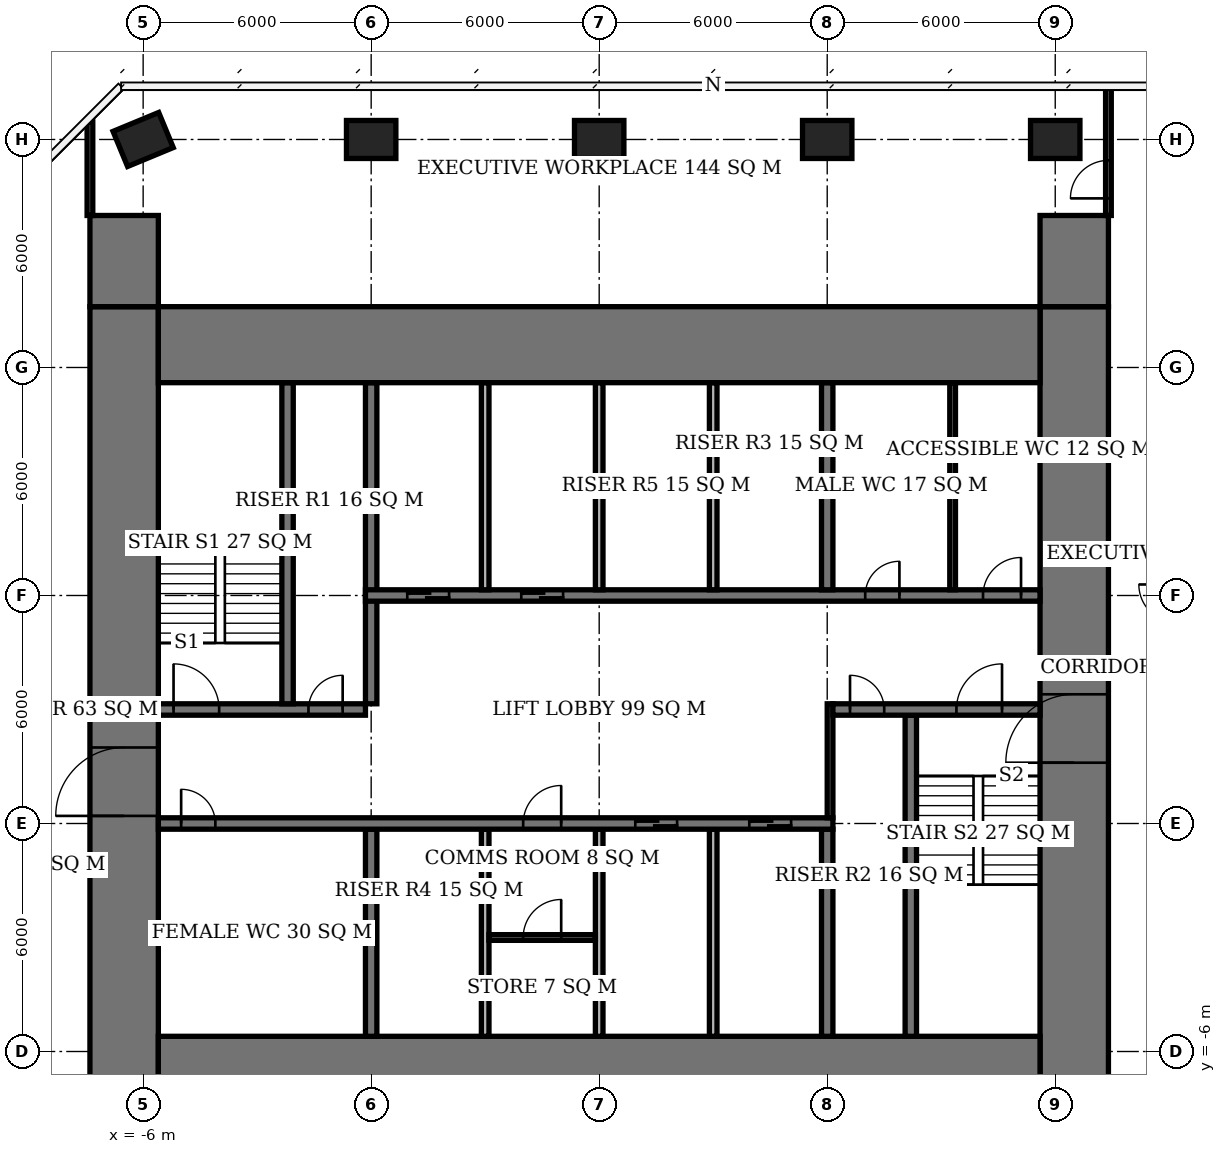
"""IFC4 building model, lengths in metres.
Left out: names, types, materials, properties, quantities, classifications, styles, units other than length and angle.
Written with IfcOpenShell. Run it as: python <this file> out.ifc"""

import sys

from ifc_helpers import new_model, si_unit, direction, frame, frame_2d, origin, origin_2d, place, context, subcontext, project, spatial, rectangle, extrude, element, fill, save


model = new_model("IFC4")
c1 = context("Model", 3, precision=1e-05, world=origin(), true_north=direction((0.0, 1.0)))
c2 = subcontext(c1, "Body", "Model", "MODEL_VIEW")
j1 = project(units=[si_unit("LENGTHUNIT", "METRE"), si_unit("PLANEANGLEUNIT", "RADIAN")], contexts=[c1])
p1 = place(None, origin())
s1 = spatial("IfcSite", under=j1, at=p1, CompositionType="ELEMENT")
p2 = place(p1, origin())
s2 = spatial("IfcBuilding", under=s1, at=p2, CompositionType="ELEMENT")
p3 = place(p2, frame((0.0, 0.0, 272.3)))
s3 = spatial("IfcBuildingStorey", under=s2, at=p3, CompositionType="ELEMENT", Elevation=272.3)
for number, where, z_axis, x_axis in (
    (1, (-6.0, 18.0, 0.0), (0.0, 0.0, 1.0), (0.924, 0.383, 0.0)),
    (2, (0.0, 18.0, 0.0), (0.0, 0.0, 1.0), (1.0, 0.0, 0.0)),
    (3, (6.0, 18.0, 0.0), (0.0, 0.0, 1.0), (1.0, 0.0, 0.0)),
    (4, (12.0, 18.0, 0.0), (0.0, 0.0, 1.0), (1.0, 0.0, 0.0)),
    (5, (18.0, 18.0, 0.0), (0.0, 0.0, 1.0), (1.0, 0.0, 0.0)),
):
    element("IfcColumn", number, at=place(p3, frame(where, z_axis=z_axis, x_axis=x_axis)), inside=s3, PredefinedType="COLUMN", context=c2, shape_type="SweptSolid", body=[
        extrude(rectangle(XDim=1.3, YDim=1.0, at=origin_2d()), origin(), (0.0, 0.0, 1.0), 3.9),
    ])
for number, where, z_axis, x_axis in (
    (6, (-5.6, -6.6, 0.0), (0.0, 0.0, 1.0), (1.0, 0.0, 0.0)),
    (7, (-5.6, 12.6, 0.0), (0.0, 0.0, 1.0), (1.0, 0.0, 0.0)),
):
    element("IfcWall", number, at=place(p3, frame(where, z_axis=z_axis, x_axis=x_axis)), inside=s3, PredefinedType="SHEAR", context=c2, shape_type="SweptSolid", body=[
        extrude(rectangle(XDim=23.2, YDim=2.0, at=frame_2d((11.6, 0.0))), origin(), (0.0, 0.0, 1.0), 3.9),
    ])
p4 = place(p3, frame((-6.5, -7.6, 0.0), z_axis=(0.0, 0.0, 1.0), x_axis=(0.0, 1.0, 0.0)))
e8 = element("IfcWall", 8, at=p4, inside=s3, PredefinedType="SHEAR", context=c2, shape_type="SweptSolid", body=[
    extrude(rectangle(XDim=21.2, YDim=1.8, at=frame_2d((10.6, 0.0))), origin(), (0.0, 0.0, 1.0), 3.9),
])
p5 = place(p4, frame((7.8, 0.0, 0.0)))
e9 = element("IfcOpeningElement", 9, at=p5, cuts=e8, PredefinedType="OPENING", context=c2, shape_type="SweptSolid", body=[
    extrude(rectangle(XDim=1.8, YDim=2.4, at=frame_2d((0.9, 1.2))), frame((0.0, 0.91, 0.0), z_axis=(0.0, -1.0, 0.0), x_axis=(1.0, 0.0, 0.0)), (0.0, 0.0, 1.0), 1.82),
])
p6 = place(p3, frame((18.5, -7.6, 0.0), z_axis=(0.0, 0.0, 1.0), x_axis=(0.0, 1.0, 0.0)))
e10 = element("IfcWall", 10, at=p6, inside=s3, PredefinedType="SHEAR", context=c2, shape_type="SweptSolid", body=[
    extrude(rectangle(XDim=21.2, YDim=1.8, at=frame_2d((10.6, 0.0))), origin(), (0.0, 0.0, 1.0), 3.9),
])
p7 = place(p6, frame((9.2, 0.0, 0.0)))
e11 = element("IfcOpeningElement", 11, at=p7, cuts=e10, PredefinedType="OPENING", context=c2, shape_type="SweptSolid", body=[
    extrude(rectangle(XDim=1.8, YDim=2.4, at=frame_2d((0.9, 1.2))), frame((0.0, 0.91, 0.0), z_axis=(0.0, -1.0, 0.0), x_axis=(1.0, 0.0, 0.0)), (0.0, 0.0, 1.0), 1.82),
])
for number, where, z_axis, x_axis in (
    (12, (-6.5, 13.6, 0.0), (0.0, 0.0, 1.0), (0.0, 1.0, 0.0)),
    (13, (18.5, 13.6, 0.0), (0.0, 0.0, 1.0), (0.0, 1.0, 0.0)),
):
    element("IfcWall", number, at=place(p3, frame(where, z_axis=z_axis, x_axis=x_axis)), inside=s3, PredefinedType="SHEAR", context=c2, shape_type="SweptSolid", body=[
        extrude(rectangle(XDim=2.4, YDim=1.8, at=frame_2d((1.2, 0.0))), origin(), (0.0, 0.0, 1.0), 3.9),
    ])
p8 = place(p3, frame((-5.6, 0.0, 0.0), z_axis=(0.0, 0.0, 1.0), x_axis=(1.0, 0.0, 0.0)))
e14 = element("IfcWall", 14, at=p8, inside=s3, PredefinedType="SHEAR", context=c2, shape_type="SweptSolid", body=[
    extrude(rectangle(XDim=17.75, YDim=0.3, at=frame_2d((8.875, 0.0))), origin(), (0.0, 0.0, 1.0), 3.9),
])
p9 = place(p8, frame((0.6, 0.0, 0.0)))
e15 = element("IfcOpeningElement", 15, at=p9, cuts=e14, PredefinedType="OPENING", context=c2, shape_type="SweptSolid", body=[
    extrude(rectangle(XDim=0.9, YDim=2.1, at=frame_2d((0.45, 1.05))), frame((0.0, 0.16, 0.0), z_axis=(0.0, -1.0, 0.0), x_axis=(1.0, 0.0, 0.0)), (0.0, 0.0, 1.0), 0.32),
])
p10 = place(p8, frame((9.6, 0.0, 0.0)))
e16 = element("IfcOpeningElement", 16, at=p10, cuts=e14, PredefinedType="OPENING", context=c2, shape_type="SweptSolid", body=[
    extrude(rectangle(XDim=1.0, YDim=2.1, at=frame_2d((0.5, 1.05))), frame((0.0, 0.16, 0.0), z_axis=(0.0, -1.0, 0.0), x_axis=(1.0, 0.0, 0.0)), (0.0, 0.0, 1.0), 0.32),
])
p11 = place(p8, frame((12.55, 0.0, 0.0)))
e17 = element("IfcOpeningElement", 17, at=p11, cuts=e14, PredefinedType="OPENING", context=c2, shape_type="SweptSolid", body=[
    extrude(rectangle(XDim=1.1, YDim=2.1, at=frame_2d((0.55, 1.05))), frame((0.0, 0.16, 0.0), z_axis=(0.0, -1.0, 0.0), x_axis=(1.0, 0.0, 0.0)), (0.0, 0.0, 1.0), 0.32),
])
p12 = place(p8, frame((15.55, 0.0, 0.0)))
e18 = element("IfcOpeningElement", 18, at=p12, cuts=e14, PredefinedType="OPENING", context=c2, shape_type="SweptSolid", body=[
    extrude(rectangle(XDim=1.1, YDim=2.1, at=frame_2d((0.55, 1.05))), frame((0.0, 0.16, 0.0), z_axis=(0.0, -1.0, 0.0), x_axis=(1.0, 0.0, 0.0)), (0.0, 0.0, 1.0), 0.32),
])
p13 = place(p3, frame((-5.6, 3.0, 0.0), z_axis=(0.0, 0.0, 1.0), x_axis=(1.0, 0.0, 0.0)))
e19 = element("IfcWall", 19, at=p13, inside=s3, PredefinedType="SHEAR", context=c2, shape_type="SweptSolid", body=[
    extrude(rectangle(XDim=5.45, YDim=0.3, at=frame_2d((2.725, 0.0))), origin(), (0.0, 0.0, 1.0), 3.9),
])
p14 = place(p13, frame((0.4, 0.0, 0.0)))
e20 = element("IfcOpeningElement", 20, at=p14, cuts=e19, PredefinedType="OPENING", context=c2, shape_type="SweptSolid", body=[
    extrude(rectangle(XDim=1.2, YDim=2.1, at=frame_2d((0.6, 1.05))), frame((0.0, 0.16, 0.0), z_axis=(0.0, -1.0, 0.0), x_axis=(1.0, 0.0, 0.0)), (0.0, 0.0, 1.0), 0.32),
])
p15 = place(p13, frame((3.95, 0.0, 0.0)))
e21 = element("IfcOpeningElement", 21, at=p15, cuts=e19, PredefinedType="OPENING", context=c2, shape_type="SweptSolid", body=[
    extrude(rectangle(XDim=0.9, YDim=2.1, at=frame_2d((0.45, 1.05))), frame((0.0, 0.16, 0.0), z_axis=(0.0, -1.0, 0.0), x_axis=(1.0, 0.0, 0.0)), (0.0, 0.0, 1.0), 0.32),
])
p16 = place(p3, frame((12.15, 3.0, 0.0), z_axis=(0.0, 0.0, 1.0), x_axis=(1.0, 0.0, 0.0)))
e22 = element("IfcWall", 22, at=p16, inside=s3, PredefinedType="SHEAR", context=c2, shape_type="SweptSolid", body=[
    extrude(rectangle(XDim=5.45, YDim=0.3, at=frame_2d((2.725, 0.0))), origin(), (0.0, 0.0, 1.0), 3.9),
])
p17 = place(p16, frame((3.25, 0.0, 0.0)))
e23 = element("IfcOpeningElement", 23, at=p17, cuts=e22, PredefinedType="OPENING", context=c2, shape_type="SweptSolid", body=[
    extrude(rectangle(XDim=1.2, YDim=2.1, at=frame_2d((0.6, 1.05))), frame((0.0, 0.16, 0.0), z_axis=(0.0, -1.0, 0.0), x_axis=(1.0, 0.0, 0.0)), (0.0, 0.0, 1.0), 0.32),
])
p18 = place(p16, frame((0.45, 0.0, 0.0)))
e24 = element("IfcOpeningElement", 24, at=p18, cuts=e22, PredefinedType="OPENING", context=c2, shape_type="SweptSolid", body=[
    extrude(rectangle(XDim=0.9, YDim=2.1, at=frame_2d((0.45, 1.05))), frame((0.0, 0.16, 0.0), z_axis=(0.0, -1.0, 0.0), x_axis=(1.0, 0.0, 0.0)), (0.0, 0.0, 1.0), 0.32),
])
p19 = place(p3, frame((-0.15, 6.0, 0.0), z_axis=(0.0, 0.0, 1.0), x_axis=(1.0, 0.0, 0.0)))
e25 = element("IfcWall", 25, at=p19, inside=s3, PredefinedType="SHEAR", context=c2, shape_type="SweptSolid", body=[
    extrude(rectangle(XDim=17.75, YDim=0.3, at=frame_2d((8.875, 0.0))), origin(), (0.0, 0.0, 1.0), 3.9),
])
p20 = place(p19, frame((13.15, 0.0, 0.0)))
e26 = element("IfcOpeningElement", 26, at=p20, cuts=e25, PredefinedType="OPENING", context=c2, shape_type="SweptSolid", body=[
    extrude(rectangle(XDim=0.9, YDim=2.1, at=frame_2d((0.45, 1.05))), frame((0.0, 0.16, 0.0), z_axis=(0.0, -1.0, 0.0), x_axis=(1.0, 0.0, 0.0)), (0.0, 0.0, 1.0), 0.32),
])
p21 = place(p19, frame((16.25, 0.0, 0.0)))
e27 = element("IfcOpeningElement", 27, at=p21, cuts=e25, PredefinedType="OPENING", context=c2, shape_type="SweptSolid", body=[
    extrude(rectangle(XDim=1.0, YDim=2.1, at=frame_2d((0.5, 1.05))), frame((0.0, 0.16, 0.0), z_axis=(0.0, -1.0, 0.0), x_axis=(1.0, 0.0, 0.0)), (0.0, 0.0, 1.0), 0.32),
])
p22 = place(p19, frame((1.1, 0.0, 0.0)))
e28 = element("IfcOpeningElement", 28, at=p22, cuts=e25, PredefinedType="OPENING", context=c2, shape_type="SweptSolid", body=[
    extrude(rectangle(XDim=1.1, YDim=2.1, at=frame_2d((0.55, 1.05))), frame((0.0, 0.16, 0.0), z_axis=(0.0, -1.0, 0.0), x_axis=(1.0, 0.0, 0.0)), (0.0, 0.0, 1.0), 0.32),
])
p23 = place(p19, frame((4.1, 0.0, 0.0)))
e29 = element("IfcOpeningElement", 29, at=p23, cuts=e25, PredefinedType="OPENING", context=c2, shape_type="SweptSolid", body=[
    extrude(rectangle(XDim=1.1, YDim=2.1, at=frame_2d((0.55, 1.05))), frame((0.0, 0.16, 0.0), z_axis=(0.0, -1.0, 0.0), x_axis=(1.0, 0.0, 0.0)), (0.0, 0.0, 1.0), 0.32),
])
p24 = place(p3, frame((0.0, -5.6, 0.0), z_axis=(0.0, 0.0, 1.0), x_axis=(0.0, 1.0, 0.0)))
e30 = element("IfcWall", 30, at=p24, inside=s3, PredefinedType="SHEAR", context=c2, shape_type="SweptSolid", body=[
    extrude(rectangle(XDim=5.45, YDim=0.3, at=frame_2d((2.725, 0.0))), origin(), (0.0, 0.0, 1.0), 3.9),
])
p25 = place(p3, frame((0.0, 3.15, 0.0), z_axis=(0.0, 0.0, 1.0), x_axis=(0.0, 1.0, 0.0)))
e31 = element("IfcWall", 31, at=p25, inside=s3, PredefinedType="SHEAR", context=c2, shape_type="SweptSolid", body=[
    extrude(rectangle(XDim=8.45, YDim=0.3, at=frame_2d((4.225, 0.0))), origin(), (0.0, 0.0, 1.0), 3.9),
])
for number, where, z_axis, x_axis in (
    (32, (12.0, -5.6, 0.0), (0.0, 0.0, 1.0), (0.0, 1.0, 0.0)),
    (33, (12.0, 6.15, 0.0), (0.0, 0.0, 1.0), (0.0, 1.0, 0.0)),
):
    element("IfcWall", number, at=place(p3, frame(where, z_axis=z_axis, x_axis=x_axis)), inside=s3, PredefinedType="SHEAR", context=c2, shape_type="SweptSolid", body=[
        extrude(rectangle(XDim=5.45, YDim=0.3, at=frame_2d((2.725, 0.0))), origin(), (0.0, 0.0, 1.0), 3.9),
    ])
for number, where, z_axis, x_axis in (
    (34, (-2.2, 3.15, 0.0), (0.0, 0.0, 1.0), (0.0, 1.0, 0.0)),
    (35, (14.2, -5.6, 0.0), (0.0, 0.0, 1.0), (0.0, 1.0, 0.0)),
):
    element("IfcWall", number, at=place(p3, frame(where, z_axis=z_axis, x_axis=x_axis)), inside=s3, PredefinedType="SHEAR", context=c2, shape_type="SweptSolid", body=[
        extrude(rectangle(XDim=8.45, YDim=0.3, at=frame_2d((4.225, 0.0))), origin(), (0.0, 0.0, 1.0), 3.9),
    ])
for number, where, z_axis, x_axis in (
    (36, (3.0, 6.15, 0.0), (0.0, 0.0, 1.0), (0.0, 1.0, 0.0)),
    (37, (6.0, 6.15, 0.0), (0.0, 0.0, 1.0), (0.0, 1.0, 0.0)),
    (38, (9.0, 6.15, 0.0), (0.0, 0.0, 1.0), (0.0, 1.0, 0.0)),
    (39, (3.0, -5.6, 0.0), (0.0, 0.0, 1.0), (0.0, 1.0, 0.0)),
    (40, (6.0, -5.6, 0.0), (0.0, 0.0, 1.0), (0.0, 1.0, 0.0)),
    (41, (9.0, -5.6, 0.0), (0.0, 0.0, 1.0), (0.0, 1.0, 0.0)),
):
    element("IfcWall", number, at=place(p3, frame(where, z_axis=z_axis, x_axis=x_axis)), inside=s3, PredefinedType="SOLIDWALL", context=c2, shape_type="SweptSolid", body=[
        extrude(rectangle(XDim=5.45, YDim=0.2, at=frame_2d((2.725, 0.0))), origin(), (0.0, 0.0, 1.0), 3.9),
    ])
p26 = place(p3, frame((15.3, 6.15, 0.0), z_axis=(0.0, 0.0, 1.0), x_axis=(0.0, 1.0, 0.0)))
e42 = element("IfcWall", 42, at=p26, inside=s3, PredefinedType="PLUMBINGWALL", context=c2, shape_type="SweptSolid", body=[
    extrude(rectangle(XDim=5.45, YDim=0.15, at=frame_2d((2.725, 0.0))), origin(), (0.0, 0.0, 1.0), 3.65),
])
p27 = place(p3, frame((3.1, -3.0, 0.0), z_axis=(0.0, 0.0, 1.0), x_axis=(1.0, 0.0, 0.0)))
e43 = element("IfcWall", 43, at=p27, inside=s3, PredefinedType="PARTITIONING", context=c2, shape_type="SweptSolid", body=[
    extrude(rectangle(XDim=2.8, YDim=0.15, at=frame_2d((1.4, 0.0))), origin(), (0.0, 0.0, 1.0), 3.65),
])
p28 = place(p27, frame((0.9, 0.0, 0.0)))
e44 = element("IfcOpeningElement", 44, at=p28, cuts=e43, PredefinedType="OPENING", context=c2, shape_type="SweptSolid", body=[
    extrude(rectangle(XDim=1.0, YDim=2.1, at=frame_2d((0.5, 1.05))), frame((0.0, 0.085, 0.0), z_axis=(0.0, -1.0, 0.0), x_axis=(1.0, 0.0, 0.0)), (0.0, 0.0, 1.0), 0.17),
])
p29 = place(p3, frame((-7.4, 16.0, 0.0), z_axis=(0.0, 0.0, 1.0), x_axis=(0.0, 1.0, 0.0)))
e45 = element("IfcWall", 45, at=p29, inside=s3, PredefinedType="PARTITIONING", context=c2, shape_type="SweptSolid", body=[
    extrude(rectangle(XDim=2.464, YDim=0.15, at=frame_2d((1.232, 0.0))), origin(), (0.0, 0.0, 1.0), 3.65),
])
p30 = place(p3, frame((19.4, 16.0, 0.0), z_axis=(0.0, 0.0, 1.0), x_axis=(0.0, 1.0, 0.0)))
e46 = element("IfcWall", 46, at=p30, inside=s3, PredefinedType="PARTITIONING", context=c2, shape_type="SweptSolid", body=[
    extrude(rectangle(XDim=3.375, YDim=0.15, at=frame_2d((1.688, 0.0))), origin(), (0.0, 0.0, 1.0), 3.65),
])
p31 = place(p30, frame((0.45, 0.0, 0.0)))
e47 = element("IfcOpeningElement", 47, at=p31, cuts=e46, PredefinedType="OPENING", context=c2, shape_type="SweptSolid", body=[
    extrude(rectangle(XDim=1.0, YDim=2.1, at=frame_2d((0.5, 1.05))), frame((0.0, 0.085, 0.0), z_axis=(0.0, -1.0, 0.0), x_axis=(1.0, 0.0, 0.0)), (0.0, 0.0, 1.0), 0.17),
])
p32 = place(p3, frame((12.075, 0.15, 0.0), z_axis=(0.0, 0.0, 1.0), x_axis=(0.0, 1.0, 0.0)))
e48 = element("IfcWall", 48, at=p32, inside=s3, PredefinedType="PARTITIONING", context=c2, shape_type="SweptSolid", body=[
    extrude(rectangle(XDim=3.0, YDim=0.15, at=frame_2d((1.5, 0.0))), origin(), (0.0, 0.0, 1.0), 3.65),
])
p33 = place(p5, origin())
e49 = element("IfcDoor", 49, at=p33, inside=s3, OperationType="DOUBLE_DOOR_SINGLE_SWING", PredefinedType="DOOR", context=c2, shape_type="SweptSolid", body=[
    extrude(rectangle(XDim=1.8, YDim=2.4, at=frame_2d((0.9, 1.2))), frame((0.0, 0.025, 0.0), z_axis=(0.0, -1.0, 0.0), x_axis=(1.0, 0.0, 0.0)), (0.0, 0.0, 1.0), 0.05),
])
fill(e9, e49)
p34 = place(p7, origin())
e50 = element("IfcDoor", 50, at=p34, inside=s3, OperationType="DOUBLE_DOOR_SINGLE_SWING", PredefinedType="DOOR", context=c2, shape_type="SweptSolid", body=[
    extrude(rectangle(XDim=1.8, YDim=2.4, at=frame_2d((0.9, 1.2))), frame((0.0, 0.025, 0.0), z_axis=(0.0, -1.0, 0.0), x_axis=(1.0, 0.0, 0.0)), (0.0, 0.0, 1.0), 0.05),
])
fill(e11, e50)
p35 = place(p14, origin())
e51 = element("IfcDoor", 51, at=p35, inside=s3, OperationType="SINGLE_SWING_LEFT", PredefinedType="DOOR", context=c2, shape_type="SweptSolid", body=[
    extrude(rectangle(XDim=1.2, YDim=2.1, at=frame_2d((0.6, 1.05))), frame((0.0, 0.025, 0.0), z_axis=(0.0, -1.0, 0.0), x_axis=(1.0, 0.0, 0.0)), (0.0, 0.0, 1.0), 0.05),
])
fill(e20, e51)
p36 = place(p15, origin())
e52 = element("IfcDoor", 52, at=p36, inside=s3, OperationType="SINGLE_SWING_RIGHT", PredefinedType="DOOR", context=c2, shape_type="SweptSolid", body=[
    extrude(rectangle(XDim=0.9, YDim=2.1, at=frame_2d((0.45, 1.05))), frame((0.0, 0.025, 0.0), z_axis=(0.0, -1.0, 0.0), x_axis=(1.0, 0.0, 0.0)), (0.0, 0.0, 1.0), 0.05),
])
fill(e21, e52)
p37 = place(p17, origin())
e53 = element("IfcDoor", 53, at=p37, inside=s3, OperationType="SINGLE_SWING_RIGHT", PredefinedType="DOOR", context=c2, shape_type="SweptSolid", body=[
    extrude(rectangle(XDim=1.2, YDim=2.1, at=frame_2d((0.6, 1.05))), frame((0.0, 0.025, 0.0), z_axis=(0.0, -1.0, 0.0), x_axis=(1.0, 0.0, 0.0)), (0.0, 0.0, 1.0), 0.05),
])
fill(e23, e53)
p38 = place(p18, origin())
e54 = element("IfcDoor", 54, at=p38, inside=s3, OperationType="SINGLE_SWING_LEFT", PredefinedType="DOOR", context=c2, shape_type="SweptSolid", body=[
    extrude(rectangle(XDim=0.9, YDim=2.1, at=frame_2d((0.45, 1.05))), frame((0.0, 0.025, 0.0), z_axis=(0.0, -1.0, 0.0), x_axis=(1.0, 0.0, 0.0)), (0.0, 0.0, 1.0), 0.05),
])
fill(e24, e54)
p39 = place(p9, origin())
e55 = element("IfcDoor", 55, at=p39, inside=s3, OperationType="SINGLE_SWING_LEFT", PredefinedType="DOOR", context=c2, shape_type="SweptSolid", body=[
    extrude(rectangle(XDim=0.9, YDim=2.1, at=frame_2d((0.45, 1.05))), frame((0.0, 0.025, 0.0), z_axis=(0.0, -1.0, 0.0), x_axis=(1.0, 0.0, 0.0)), (0.0, 0.0, 1.0), 0.05),
])
fill(e15, e55)
p40 = place(p20, origin())
e56 = element("IfcDoor", 56, at=p40, inside=s3, OperationType="SINGLE_SWING_RIGHT", PredefinedType="DOOR", context=c2, shape_type="SweptSolid", body=[
    extrude(rectangle(XDim=0.9, YDim=2.1, at=frame_2d((0.45, 1.05))), frame((0.0, 0.025, 0.0), z_axis=(0.0, -1.0, 0.0), x_axis=(1.0, 0.0, 0.0)), (0.0, 0.0, 1.0), 0.05),
])
fill(e26, e56)
p41 = place(p21, origin())
e57 = element("IfcDoor", 57, at=p41, inside=s3, OperationType="SINGLE_SWING_RIGHT", PredefinedType="DOOR", context=c2, shape_type="SweptSolid", body=[
    extrude(rectangle(XDim=1.0, YDim=2.1, at=frame_2d((0.5, 1.05))), frame((0.0, 0.025, 0.0), z_axis=(0.0, -1.0, 0.0), x_axis=(1.0, 0.0, 0.0)), (0.0, 0.0, 1.0), 0.05),
])
fill(e27, e57)
p42 = place(p28, origin())
e58 = element("IfcDoor", 58, at=p42, inside=s3, OperationType="SINGLE_SWING_RIGHT", PredefinedType="DOOR", context=c2, shape_type="SweptSolid", body=[
    extrude(rectangle(XDim=1.0, YDim=2.1, at=frame_2d((0.5, 1.05))), frame((0.0, 0.025, 0.0), z_axis=(0.0, -1.0, 0.0), x_axis=(1.0, 0.0, 0.0)), (0.0, 0.0, 1.0), 0.05),
])
fill(e44, e58)
p43 = place(p10, origin())
e59 = element("IfcDoor", 59, at=p43, inside=s3, OperationType="SINGLE_SWING_RIGHT", PredefinedType="DOOR", context=c2, shape_type="SweptSolid", body=[
    extrude(rectangle(XDim=1.0, YDim=2.1, at=frame_2d((0.5, 1.05))), frame((0.0, 0.025, 0.0), z_axis=(0.0, -1.0, 0.0), x_axis=(1.0, 0.0, 0.0)), (0.0, 0.0, 1.0), 0.05),
])
fill(e16, e59)
p44 = place(p22, origin())
e60 = element("IfcDoor", 60, at=p44, inside=s3, OperationType="DOUBLE_DOOR_SLIDING", PredefinedType="USERDEFINED", context=c2, shape_type="SweptSolid", body=[
    extrude(rectangle(XDim=1.1, YDim=2.1, at=frame_2d((0.55, 1.05))), frame((0.0, 0.025, 0.0), z_axis=(0.0, -1.0, 0.0), x_axis=(1.0, 0.0, 0.0)), (0.0, 0.0, 1.0), 0.05),
])
fill(e28, e60)
p45 = place(p23, origin())
e61 = element("IfcDoor", 61, at=p45, inside=s3, OperationType="DOUBLE_DOOR_SLIDING", PredefinedType="USERDEFINED", context=c2, shape_type="SweptSolid", body=[
    extrude(rectangle(XDim=1.1, YDim=2.1, at=frame_2d((0.55, 1.05))), frame((0.0, 0.025, 0.0), z_axis=(0.0, -1.0, 0.0), x_axis=(1.0, 0.0, 0.0)), (0.0, 0.0, 1.0), 0.05),
])
fill(e29, e61)
p46 = place(p11, origin())
e62 = element("IfcDoor", 62, at=p46, inside=s3, OperationType="DOUBLE_DOOR_SLIDING", PredefinedType="USERDEFINED", context=c2, shape_type="SweptSolid", body=[
    extrude(rectangle(XDim=1.1, YDim=2.1, at=frame_2d((0.55, 1.05))), frame((0.0, 0.025, 0.0), z_axis=(0.0, -1.0, 0.0), x_axis=(1.0, 0.0, 0.0)), (0.0, 0.0, 1.0), 0.05),
])
fill(e17, e62)
p47 = place(p12, origin())
e63 = element("IfcDoor", 63, at=p47, inside=s3, OperationType="DOUBLE_DOOR_SLIDING", PredefinedType="USERDEFINED", context=c2, shape_type="SweptSolid", body=[
    extrude(rectangle(XDim=1.1, YDim=2.1, at=frame_2d((0.55, 1.05))), frame((0.0, 0.025, 0.0), z_axis=(0.0, -1.0, 0.0), x_axis=(1.0, 0.0, 0.0)), (0.0, 0.0, 1.0), 0.05),
])
fill(e18, e63)
p48 = place(p31, origin())
e64 = element("IfcDoor", 64, at=p48, inside=s3, OperationType="SINGLE_SWING_LEFT", PredefinedType="DOOR", context=c2, shape_type="SweptSolid", body=[
    extrude(rectangle(XDim=1.0, YDim=2.1, at=frame_2d((0.5, 1.05))), frame((0.0, 0.025, 0.0), z_axis=(0.0, -1.0, 0.0), x_axis=(1.0, 0.0, 0.0)), (0.0, 0.0, 1.0), 0.05),
])
fill(e47, e64)
save(model, sys.argv[1])
